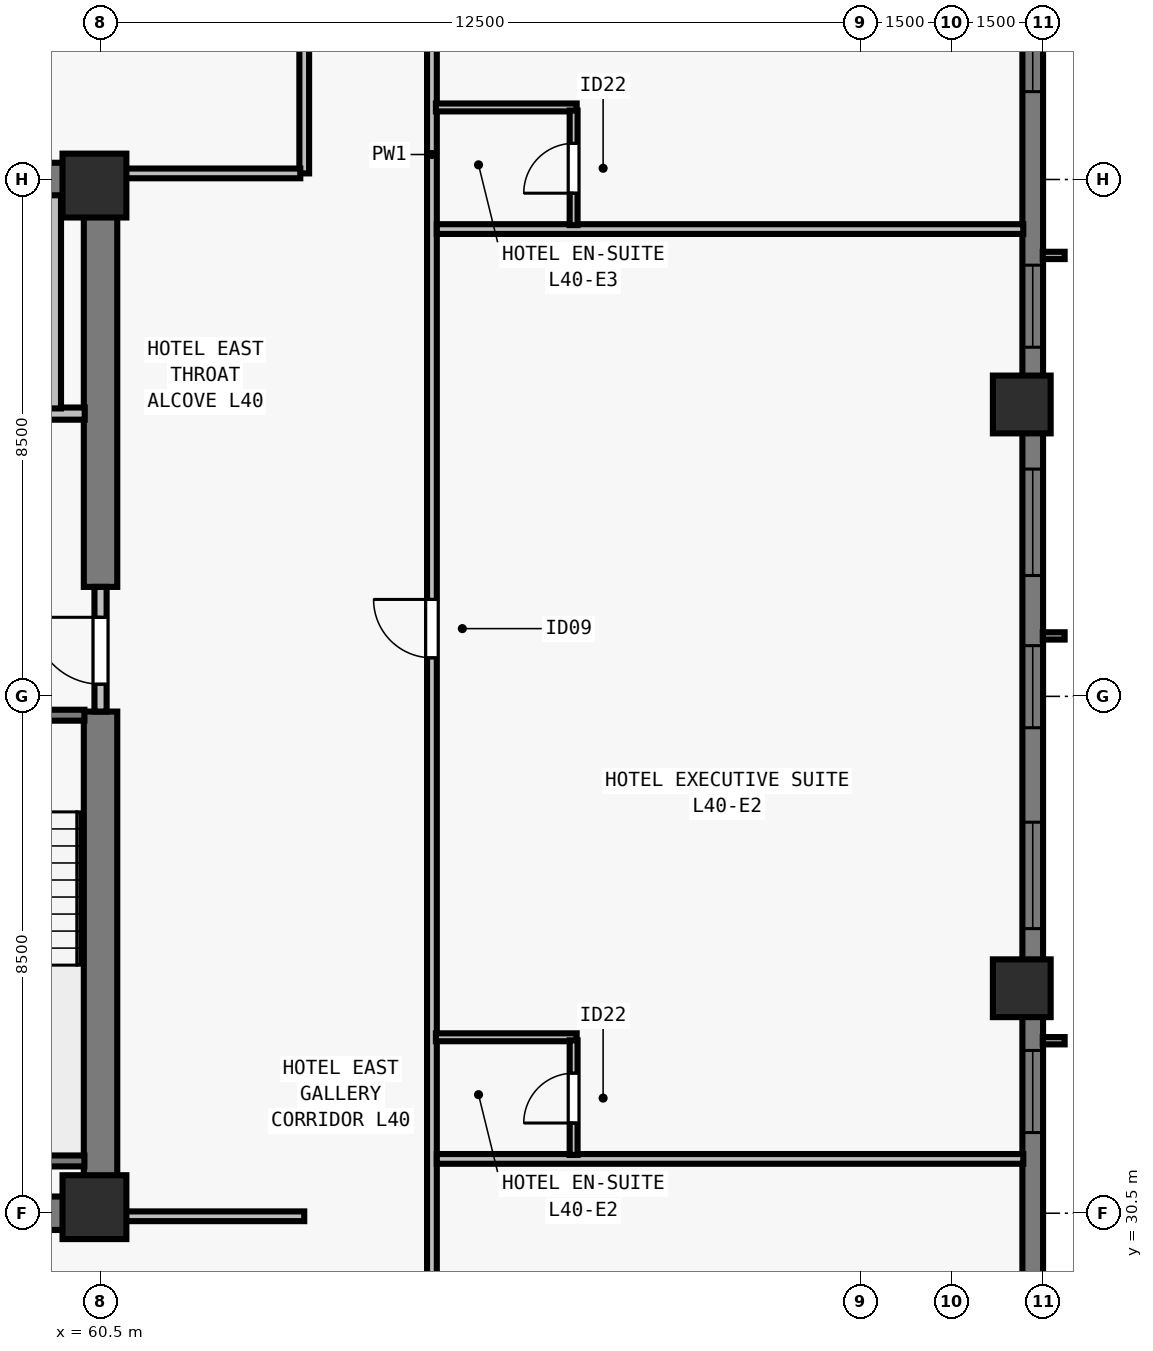
"""IFC4 building model, lengths in metres.
Left out: names, types, materials, properties, quantities, classifications, styles, units other than length and angle.
Written with IfcOpenShell. Run it as: python <this file> out.ifc"""

import sys

from ifc_helpers import new_model, si_unit, direction, frame, frame_2d, origin, origin_2d, place, context, subcontext, project, spatial, rectangle, extrude, element, fill, save


model = new_model("IFC4")
c1 = context("Model", 3, precision=1e-05, world=origin(), true_north=direction((0.0, 1.0)))
c2 = subcontext(c1, "Body", "Model", "MODEL_VIEW")
j1 = project(units=[si_unit("LENGTHUNIT", "METRE"), si_unit("PLANEANGLEUNIT", "RADIAN")], contexts=[c1])
p1 = place(None, origin())
s1 = spatial("IfcSite", under=j1, at=p1, CompositionType="ELEMENT")
p2 = place(p1, origin())
s2 = spatial("IfcBuilding", under=s1, at=p2, CompositionType="ELEMENT")
p3 = place(p2, frame((0.0, 0.0, 148.0)))
s3 = spatial("IfcBuildingStorey", under=s2, at=p3, CompositionType="ELEMENT", Elevation=148.0)
for number, where, z_axis, x_axis in (
    (1, (60.4, 30.6, 0.0), (0.0, 0.0, 1.0), (1.0, 0.0, 0.0)),
    (2, (60.4, 47.4, 0.0), (0.0, 0.0, 1.0), (1.0, 0.0, 0.0)),
):
    element("IfcColumn", number, at=place(p3, frame(where, z_axis=z_axis, x_axis=x_axis)), inside=s3, PredefinedType="COLUMN", context=c2, shape_type="SweptSolid", body=[
        extrude(rectangle(XDim=1.05, YDim=1.05, at=origin_2d()), origin(), (0.0, 0.0, 1.0), 3.5),
    ])
for number, where, z_axis, x_axis in (
    (3, (75.65, 34.2, 0.0), (0.0, 0.0, 1.0), (0.0, 1.0, 0.0)),
    (4, (75.65, 43.8, 0.0), (0.0, 0.0, 1.0), (0.0, 1.0, 0.0)),
):
    element("IfcColumn", number, at=place(p3, frame(where, z_axis=z_axis, x_axis=x_axis)), inside=s3, PredefinedType="COLUMN", context=c2, shape_type="SweptSolid", body=[
        extrude(rectangle(XDim=0.95, YDim=0.95, at=origin_2d()), origin(), (0.0, 0.0, 1.0), 3.5),
    ])
p4 = place(p3, frame((75.83, 59.0, 0.0), z_axis=(0.0, 0.0, 1.0), x_axis=(0.0, -1.0, 0.0)))
e5 = element("IfcWall", 5, at=p4, inside=s3, PredefinedType="SOLIDWALL", context=c2, shape_type="SweptSolid", body=[
    extrude(rectangle(XDim=39.682, YDim=0.34, at=frame_2d((19.841, 0.0))), origin(), (0.0, 0.0, 1.0), 3.28),
])
p5 = place(p4, frame((4.952, 0.0, 0.8)))
e6 = element("IfcOpeningElement", 6, at=p5, cuts=e5, PredefinedType="OPENING", context=c2, shape_type="SweptSolid", body=[
    extrude(rectangle(XDim=1.35, YDim=1.66, at=frame_2d((0.675, 0.83))), frame((0.0, 0.18, 0.0), z_axis=(0.0, -1.0, 0.0), x_axis=(1.0, 0.0, 0.0)), (0.0, 0.0, 1.0), 0.36),
])
p6 = place(p4, frame((8.305, 0.0, 0.8)))
e7 = element("IfcOpeningElement", 7, at=p6, cuts=e5, PredefinedType="OPENING", context=c2, shape_type="SweptSolid", body=[
    extrude(rectangle(XDim=1.75, YDim=1.66, at=frame_2d((0.875, 0.83))), frame((0.0, 0.18, 0.0), z_axis=(0.0, -1.0, 0.0), x_axis=(1.0, 0.0, 0.0)), (0.0, 0.0, 1.0), 0.36),
])
p7 = place(p4, frame((12.909, 0.0, 0.8)))
e8 = element("IfcOpeningElement", 8, at=p7, cuts=e5, PredefinedType="OPENING", context=c2, shape_type="SweptSolid", body=[
    extrude(rectangle(XDim=1.35, YDim=1.66, at=frame_2d((0.675, 0.83))), frame((0.0, 0.18, 0.0), z_axis=(0.0, -1.0, 0.0), x_axis=(1.0, 0.0, 0.0)), (0.0, 0.0, 1.0), 0.36),
])
p8 = place(p4, frame((16.262, 0.0, 0.8)))
e9 = element("IfcOpeningElement", 9, at=p8, cuts=e5, PredefinedType="OPENING", context=c2, shape_type="SweptSolid", body=[
    extrude(rectangle(XDim=1.75, YDim=1.66, at=frame_2d((0.875, 0.83))), frame((0.0, 0.18, 0.0), z_axis=(0.0, -1.0, 0.0), x_axis=(1.0, 0.0, 0.0)), (0.0, 0.0, 1.0), 0.36),
])
p9 = place(p4, frame((19.166, 0.0, 0.8)))
e10 = element("IfcOpeningElement", 10, at=p9, cuts=e5, PredefinedType="OPENING", context=c2, shape_type="SweptSolid", body=[
    extrude(rectangle(XDim=1.35, YDim=1.66, at=frame_2d((0.675, 0.83))), frame((0.0, 0.18, 0.0), z_axis=(0.0, -1.0, 0.0), x_axis=(1.0, 0.0, 0.0)), (0.0, 0.0, 1.0), 0.36),
])
p10 = place(p4, frame((22.07, 0.0, 0.8)))
e11 = element("IfcOpeningElement", 11, at=p10, cuts=e5, PredefinedType="OPENING", context=c2, shape_type="SweptSolid", body=[
    extrude(rectangle(XDim=1.75, YDim=1.66, at=frame_2d((0.875, 0.83))), frame((0.0, 0.18, 0.0), z_axis=(0.0, -1.0, 0.0), x_axis=(1.0, 0.0, 0.0)), (0.0, 0.0, 1.0), 0.36),
])
p11 = place(p4, frame((25.823, 0.0, 0.8)))
e12 = element("IfcOpeningElement", 12, at=p11, cuts=e5, PredefinedType="OPENING", context=c2, shape_type="SweptSolid", body=[
    extrude(rectangle(XDim=1.35, YDim=1.66, at=frame_2d((0.675, 0.83))), frame((0.0, 0.18, 0.0), z_axis=(0.0, -1.0, 0.0), x_axis=(1.0, 0.0, 0.0)), (0.0, 0.0, 1.0), 0.36),
])
p12 = place(p4, frame((29.627, 0.0, 0.8)))
e13 = element("IfcOpeningElement", 13, at=p12, cuts=e5, PredefinedType="OPENING", context=c2, shape_type="SweptSolid", body=[
    extrude(rectangle(XDim=1.75, YDim=1.66, at=frame_2d((0.875, 0.83))), frame((0.0, 0.18, 0.0), z_axis=(0.0, -1.0, 0.0), x_axis=(1.0, 0.0, 0.0)), (0.0, 0.0, 1.0), 0.36),
])
p13 = place(p4, frame((33.38, 0.0, 0.8)))
e14 = element("IfcOpeningElement", 14, at=p13, cuts=e5, PredefinedType="OPENING", context=c2, shape_type="SweptSolid", body=[
    extrude(rectangle(XDim=1.35, YDim=1.66, at=frame_2d((0.675, 0.83))), frame((0.0, 0.18, 0.0), z_axis=(0.0, -1.0, 0.0), x_axis=(1.0, 0.0, 0.0)), (0.0, 0.0, 1.0), 0.36),
])
for number, where, z_axis, x_axis in (
    (15, (43.225, 30.5, 0.0), (0.0, 0.0, 1.0), (1.0, 0.0, 0.0)),
    (16, (43.225, 47.5, 0.0), (0.0, 0.0, 1.0), (1.0, 0.0, 0.0)),
):
    element("IfcWall", number, at=place(p3, frame(where, z_axis=z_axis, x_axis=x_axis)), inside=s3, PredefinedType="SHEAR", context=c2, shape_type="SweptSolid", body=[
        extrude(rectangle(XDim=17.55, YDim=0.55, at=frame_2d((8.775, 0.0))), origin(), (0.0, 0.0, 1.0), 3.28),
    ])
p14 = place(p3, frame((60.5, 30.765, 0.0), z_axis=(0.0, 0.0, 1.0), x_axis=(0.0, 1.0, 0.0)))
e17 = element("IfcWall", 17, at=p14, inside=s3, PredefinedType="SHEAR", context=c2, shape_type="SweptSolid", body=[
    extrude(rectangle(XDim=7.985, YDim=0.55, at=frame_2d((3.993, 0.0))), origin(), (0.0, 0.0, 1.0), 3.28),
])
p15 = place(p3, frame((60.5, 40.8, 0.0), z_axis=(0.0, 0.0, 1.0), x_axis=(0.0, 1.0, 0.0)))
e18 = element("IfcWall", 18, at=p15, inside=s3, PredefinedType="SHEAR", context=c2, shape_type="SweptSolid", body=[
    extrude(rectangle(XDim=6.435, YDim=0.55, at=frame_2d((3.218, 0.0))), origin(), (0.0, 0.0, 1.0), 3.28),
])
p16 = place(p3, frame((60.5, 38.75, 0.0), z_axis=(0.0, 0.0, 1.0), x_axis=(0.0, 1.0, 0.0)))
e19 = element("IfcWall", 19, at=p16, inside=s3, PredefinedType="SOLIDWALL", context=c2, shape_type="SweptSolid", body=[
    extrude(rectangle(XDim=2.05, YDim=0.2, at=frame_2d((1.025, 0.0))), origin(), (0.0, 0.0, 1.0), 3.28),
])
p17 = place(p16, frame((0.45, 0.0, 0.0)))
e20 = element("IfcOpeningElement", 20, at=p17, cuts=e19, PredefinedType="OPENING", context=c2, shape_type="SweptSolid", body=[
    extrude(rectangle(XDim=1.1, YDim=2.15, at=frame_2d((0.55, 1.075))), frame((0.0, 0.11, 0.0), z_axis=(0.0, -1.0, 0.0), x_axis=(1.0, 0.0, 0.0)), (0.0, 0.0, 1.0), 0.22),
])
p18 = place(p3, frame((56.735, 43.65, 0.0), z_axis=(0.0, 0.0, 1.0), x_axis=(1.0, 0.0, 0.0)))
e21 = element("IfcWall", 21, at=p18, inside=s3, PredefinedType="SOLIDWALL", context=c2, shape_type="SweptSolid", body=[
    extrude(rectangle(XDim=3.505, YDim=0.2, at=frame_2d((1.752, 0.0))), origin(), (0.0, 0.0, 1.0), 3.28),
])
p19 = place(p18, frame((1.295, 0.0, 0.0)))
e22 = element("IfcOpeningElement", 22, at=p19, cuts=e21, PredefinedType="OPENING", context=c2, shape_type="SweptSolid", body=[
    extrude(rectangle(XDim=1.1, YDim=2.2, at=frame_2d((0.55, 1.1))), frame((0.0, 0.11, 0.0), z_axis=(0.0, -1.0, 0.0), x_axis=(1.0, 0.0, 0.0)), (0.0, 0.0, 1.0), 0.22),
])
p20 = place(p3, frame((59.75, 43.735, 0.0), z_axis=(0.0, 0.0, 1.0), x_axis=(0.0, 1.0, 0.0)))
e23 = element("IfcWall", 23, at=p20, inside=s3, PredefinedType="SOLIDWALL", context=c2, shape_type="SweptSolid", body=[
    extrude(rectangle(XDim=3.505, YDim=0.2, at=frame_2d((1.752, 0.0))), origin(), (0.0, 0.0, 1.0), 3.28),
])
p21 = place(p3, frame((65.95, 15.325, 0.0), z_axis=(0.0, 0.0, 1.0), x_axis=(0.0, 1.0, 0.0)))
e24 = element("IfcWall", 24, at=p21, inside=s3, PredefinedType="PARTITIONING", context=c2, shape_type="SweptSolid", body=[
    extrude(rectangle(XDim=47.35, YDim=0.16, at=frame_2d((23.675, 0.0))), origin(), (0.0, 0.0, 1.0), 2.555),
])
p22 = place(p21, frame((8.902, 0.0, 0.0)))
e25 = element("IfcOpeningElement", 25, at=p22, cuts=e24, PredefinedType="OPENING", context=c2, shape_type="SweptSolid", body=[
    extrude(rectangle(XDim=0.96, YDim=2.15, at=frame_2d((0.48, 1.075))), frame((0.0, 0.09, 0.0), z_axis=(0.0, -1.0, 0.0), x_axis=(1.0, 0.0, 0.0)), (0.0, 0.0, 1.0), 0.18),
])
p23 = place(p21, frame((24.309, 0.0, 0.0)))
e26 = element("IfcOpeningElement", 26, at=p23, cuts=e24, PredefinedType="OPENING", context=c2, shape_type="SweptSolid", body=[
    extrude(rectangle(XDim=0.96, YDim=2.15, at=frame_2d((0.48, 1.075))), frame((0.0, 0.09, 0.0), z_axis=(0.0, -1.0, 0.0), x_axis=(1.0, 0.0, 0.0)), (0.0, 0.0, 1.0), 0.18),
])
p24 = place(p21, frame((39.902, 0.0, 0.0)))
e27 = element("IfcOpeningElement", 27, at=p24, cuts=e24, PredefinedType="OPENING", context=c2, shape_type="SweptSolid", body=[
    extrude(rectangle(XDim=0.96, YDim=2.15, at=frame_2d((0.48, 1.075))), frame((0.0, 0.09, 0.0), z_axis=(0.0, -1.0, 0.0), x_axis=(1.0, 0.0, 0.0)), (0.0, 0.0, 1.0), 0.18),
])
p25 = place(p3, frame((63.85, 47.6, 0.0), z_axis=(0.0, 0.0, 1.0), x_axis=(0.0, 1.0, 0.0)))
e28 = element("IfcWall", 28, at=p25, inside=s3, PredefinedType="PARTITIONING", context=c2, shape_type="SweptSolid", body=[
    extrude(rectangle(XDim=15.075, YDim=0.16, at=frame_2d((7.538, 0.0))), origin(), (0.0, 0.0, 1.0), 2.555),
])
p26 = place(p3, frame((60.765, 30.45, 0.0), z_axis=(0.0, 0.0, 1.0), x_axis=(1.0, 0.0, 0.0)))
e29 = element("IfcWall", 29, at=p26, inside=s3, PredefinedType="PARTITIONING", context=c2, shape_type="SweptSolid", body=[
    extrude(rectangle(XDim=3.085, YDim=0.16, at=frame_2d((1.542, 0.0))), origin(), (0.0, 0.0, 1.0), 3.28),
])
p27 = place(p3, frame((60.765, 47.6, 0.0), z_axis=(0.0, 0.0, 1.0), x_axis=(1.0, 0.0, 0.0)))
e30 = element("IfcWall", 30, at=p27, inside=s3, PredefinedType="PARTITIONING", context=c2, shape_type="SweptSolid", body=[
    extrude(rectangle(XDim=3.02, YDim=0.16, at=frame_2d((1.51, 0.0))), origin(), (0.0, 0.0, 1.0), 3.28),
])
p28 = place(p3, frame((66.03, 31.394, 0.0), z_axis=(0.0, 0.0, 1.0), x_axis=(1.0, 0.0, 0.0)))
e31 = element("IfcWall", 31, at=p28, inside=s3, PredefinedType="PARTITIONING", context=c2, shape_type="SweptSolid", body=[
    extrude(rectangle(XDim=9.645, YDim=0.16, at=frame_2d((4.823, 0.0))), origin(), (0.0, 0.0, 1.0), 3.28),
])
p29 = place(p3, frame((66.015, 33.394, 0.0), z_axis=(0.0, 0.0, 1.0), x_axis=(1.0, 0.0, 0.0)))
e32 = element("IfcWall", 32, at=p29, inside=s3, PredefinedType="PLUMBINGWALL", context=c2, shape_type="SweptSolid", body=[
    extrude(rectangle(XDim=2.315, YDim=0.13, at=frame_2d((1.158, 0.0))), origin(), (0.0, 0.0, 1.0), 3.28),
])
p30 = place(p3, frame((68.28, 31.458, 0.0), z_axis=(0.0, 0.0, 1.0), x_axis=(0.0, 1.0, 0.0)))
e33 = element("IfcWall", 33, at=p30, inside=s3, PredefinedType="PLUMBINGWALL", context=c2, shape_type="SweptSolid", body=[
    extrude(rectangle(XDim=1.885, YDim=0.13, at=frame_2d((0.942, 0.0))), origin(), (0.0, 0.0, 1.0), 3.28),
])
p31 = place(p30, frame((0.525, 0.0, 0.0)))
e34 = element("IfcOpeningElement", 34, at=p31, cuts=e33, PredefinedType="OPENING", context=c2, shape_type="SweptSolid", body=[
    extrude(rectangle(XDim=0.82, YDim=2.1, at=frame_2d((0.41, 1.05))), frame((0.0, 0.075, 0.0), z_axis=(0.0, -1.0, 0.0), x_axis=(1.0, 0.0, 0.0)), (0.0, 0.0, 1.0), 0.15),
])
p32 = place(p3, frame((66.03, 46.685, 0.0), z_axis=(0.0, 0.0, 1.0), x_axis=(1.0, 0.0, 0.0)))
e35 = element("IfcWall", 35, at=p32, inside=s3, PredefinedType="PARTITIONING", context=c2, shape_type="SweptSolid", body=[
    extrude(rectangle(XDim=9.645, YDim=0.16, at=frame_2d((4.823, 0.0))), origin(), (0.0, 0.0, 1.0), 3.28),
])
p33 = place(p3, frame((66.015, 48.685, 0.0), z_axis=(0.0, 0.0, 1.0), x_axis=(1.0, 0.0, 0.0)))
e36 = element("IfcWall", 36, at=p33, inside=s3, PredefinedType="PLUMBINGWALL", context=c2, shape_type="SweptSolid", body=[
    extrude(rectangle(XDim=2.315, YDim=0.13, at=frame_2d((1.158, 0.0))), origin(), (0.0, 0.0, 1.0), 3.28),
])
p34 = place(p3, frame((68.28, 46.75, 0.0), z_axis=(0.0, 0.0, 1.0), x_axis=(0.0, 1.0, 0.0)))
e37 = element("IfcWall", 37, at=p34, inside=s3, PredefinedType="PLUMBINGWALL", context=c2, shape_type="SweptSolid", body=[
    extrude(rectangle(XDim=1.885, YDim=0.13, at=frame_2d((0.942, 0.0))), origin(), (0.0, 0.0, 1.0), 3.28),
])
p35 = place(p34, frame((0.525, 0.0, 0.0)))
e38 = element("IfcOpeningElement", 38, at=p35, cuts=e37, PredefinedType="OPENING", context=c2, shape_type="SweptSolid", body=[
    extrude(rectangle(XDim=0.82, YDim=2.1, at=frame_2d((0.41, 1.05))), frame((0.0, 0.075, 0.0), z_axis=(0.0, -1.0, 0.0), x_axis=(1.0, 0.0, 0.0)), (0.0, 0.0, 1.0), 0.15),
])
p36 = place(p3, frame((57.005, 38.69, 0.0), z_axis=(0.0, 0.0, 1.0), x_axis=(1.0, 0.0, 0.0)))
e39 = element("IfcWall", 39, at=p36, inside=s3, PredefinedType="SOLIDWALL", context=c2, shape_type="SweptSolid", body=[
    extrude(rectangle(XDim=3.23, YDim=0.18, at=frame_2d((1.615, 0.0))), origin(), (0.0, 0.0, 1.0), 3.28),
])
p37 = place(p36, frame((1.14, 0.0, 0.0)))
e40 = element("IfcOpeningElement", 40, at=p37, cuts=e39, PredefinedType="OPENING", context=c2, shape_type="SweptSolid", body=[
    extrude(rectangle(XDim=0.95, YDim=2.15, at=frame_2d((0.475, 1.075))), frame((0.0, 0.1, 0.0), z_axis=(0.0, -1.0, 0.0), x_axis=(1.0, 0.0, 0.0)), (0.0, 0.0, 1.0), 0.2),
])
p38 = place(p3, frame((57.005, 31.36, 0.0), z_axis=(0.0, 0.0, 1.0), x_axis=(1.0, 0.0, 0.0)))
e41 = element("IfcWall", 41, at=p38, inside=s3, PredefinedType="SOLIDWALL", context=c2, shape_type="SweptSolid", body=[
    extrude(rectangle(XDim=3.23, YDim=0.18, at=frame_2d((1.615, 0.0))), origin(), (0.0, 0.0, 1.0), 3.28),
])
p39 = place(p6, origin())
e42 = element("IfcWindow", 42, at=p39, inside=s3, PartitioningType="SINGLE_PANEL", PredefinedType="WINDOW", context=c2, shape_type="SweptSolid", body=[
    extrude(rectangle(XDim=1.75, YDim=1.66, at=frame_2d((0.875, 0.83))), frame((0.0, -0.05, 0.0), z_axis=(0.0, -1.0, 0.0), x_axis=(1.0, 0.0, 0.0)), (0.0, 0.0, 1.0), 0.06),
])
fill(e7, e42)
p40 = place(p7, origin())
e43 = element("IfcWindow", 43, at=p40, inside=s3, PartitioningType="SINGLE_PANEL", PredefinedType="WINDOW", context=c2, shape_type="SweptSolid", body=[
    extrude(rectangle(XDim=1.35, YDim=1.66, at=frame_2d((0.675, 0.83))), frame((0.0, -0.05, 0.0), z_axis=(0.0, -1.0, 0.0), x_axis=(1.0, 0.0, 0.0)), (0.0, 0.0, 1.0), 0.06),
])
fill(e8, e43)
p41 = place(p8, origin())
e44 = element("IfcWindow", 44, at=p41, inside=s3, PartitioningType="SINGLE_PANEL", PredefinedType="WINDOW", context=c2, shape_type="SweptSolid", body=[
    extrude(rectangle(XDim=1.75, YDim=1.66, at=frame_2d((0.875, 0.83))), frame((0.0, -0.05, 0.0), z_axis=(0.0, -1.0, 0.0), x_axis=(1.0, 0.0, 0.0)), (0.0, 0.0, 1.0), 0.06),
])
fill(e9, e44)
p42 = place(p9, origin())
e45 = element("IfcWindow", 45, at=p42, inside=s3, PartitioningType="SINGLE_PANEL", PredefinedType="WINDOW", context=c2, shape_type="SweptSolid", body=[
    extrude(rectangle(XDim=1.35, YDim=1.66, at=frame_2d((0.675, 0.83))), frame((0.0, -0.05, 0.0), z_axis=(0.0, -1.0, 0.0), x_axis=(1.0, 0.0, 0.0)), (0.0, 0.0, 1.0), 0.06),
])
fill(e10, e45)
p43 = place(p10, origin())
e46 = element("IfcWindow", 46, at=p43, inside=s3, PartitioningType="SINGLE_PANEL", PredefinedType="WINDOW", context=c2, shape_type="SweptSolid", body=[
    extrude(rectangle(XDim=1.75, YDim=1.66, at=frame_2d((0.875, 0.83))), frame((0.0, -0.05, 0.0), z_axis=(0.0, -1.0, 0.0), x_axis=(1.0, 0.0, 0.0)), (0.0, 0.0, 1.0), 0.06),
])
fill(e11, e46)
p44 = place(p11, origin())
e47 = element("IfcWindow", 47, at=p44, inside=s3, PartitioningType="SINGLE_PANEL", PredefinedType="WINDOW", context=c2, shape_type="SweptSolid", body=[
    extrude(rectangle(XDim=1.35, YDim=1.66, at=frame_2d((0.675, 0.83))), frame((0.0, -0.05, 0.0), z_axis=(0.0, -1.0, 0.0), x_axis=(1.0, 0.0, 0.0)), (0.0, 0.0, 1.0), 0.06),
])
fill(e12, e47)
p45 = place(p17, origin())
e48 = element("IfcDoor", 48, at=p45, inside=s3, OperationType="SINGLE_SWING_RIGHT", PredefinedType="DOOR", context=c2, shape_type="SweptSolid", body=[
    extrude(rectangle(XDim=1.1, YDim=2.15, at=frame_2d((0.55, 1.075))), frame((0.0, 0.025, 0.0), z_axis=(0.0, -1.0, 0.0), x_axis=(1.0, 0.0, 0.0)), (0.0, 0.0, 1.0), 0.05),
])
fill(e20, e48)
p46 = place(p31, origin())
e49 = element("IfcDoor", 49, at=p46, inside=s3, OperationType="SINGLE_SWING_LEFT", PredefinedType="DOOR", context=c2, shape_type="SweptSolid", body=[
    extrude(rectangle(XDim=0.82, YDim=2.1, at=frame_2d((0.41, 1.05))), frame((0.0, 0.025, 0.0), z_axis=(0.0, -1.0, 0.0), x_axis=(1.0, 0.0, 0.0)), (0.0, 0.0, 1.0), 0.05),
])
fill(e34, e49)
p47 = place(p23, origin())
e50 = element("IfcDoor", 50, at=p47, inside=s3, OperationType="SINGLE_SWING_RIGHT", PredefinedType="DOOR", context=c2, shape_type="SweptSolid", body=[
    extrude(rectangle(XDim=0.96, YDim=2.15, at=frame_2d((0.48, 1.075))), frame((0.0, 0.025, 0.0), z_axis=(0.0, -1.0, 0.0), x_axis=(1.0, 0.0, 0.0)), (0.0, 0.0, 1.0), 0.05),
])
fill(e26, e50)
p48 = place(p35, origin())
e51 = element("IfcDoor", 51, at=p48, inside=s3, OperationType="SINGLE_SWING_LEFT", PredefinedType="DOOR", context=c2, shape_type="SweptSolid", body=[
    extrude(rectangle(XDim=0.82, YDim=2.1, at=frame_2d((0.41, 1.05))), frame((0.0, 0.025, 0.0), z_axis=(0.0, -1.0, 0.0), x_axis=(1.0, 0.0, 0.0)), (0.0, 0.0, 1.0), 0.05),
])
fill(e38, e51)
save(model, sys.argv[1])
